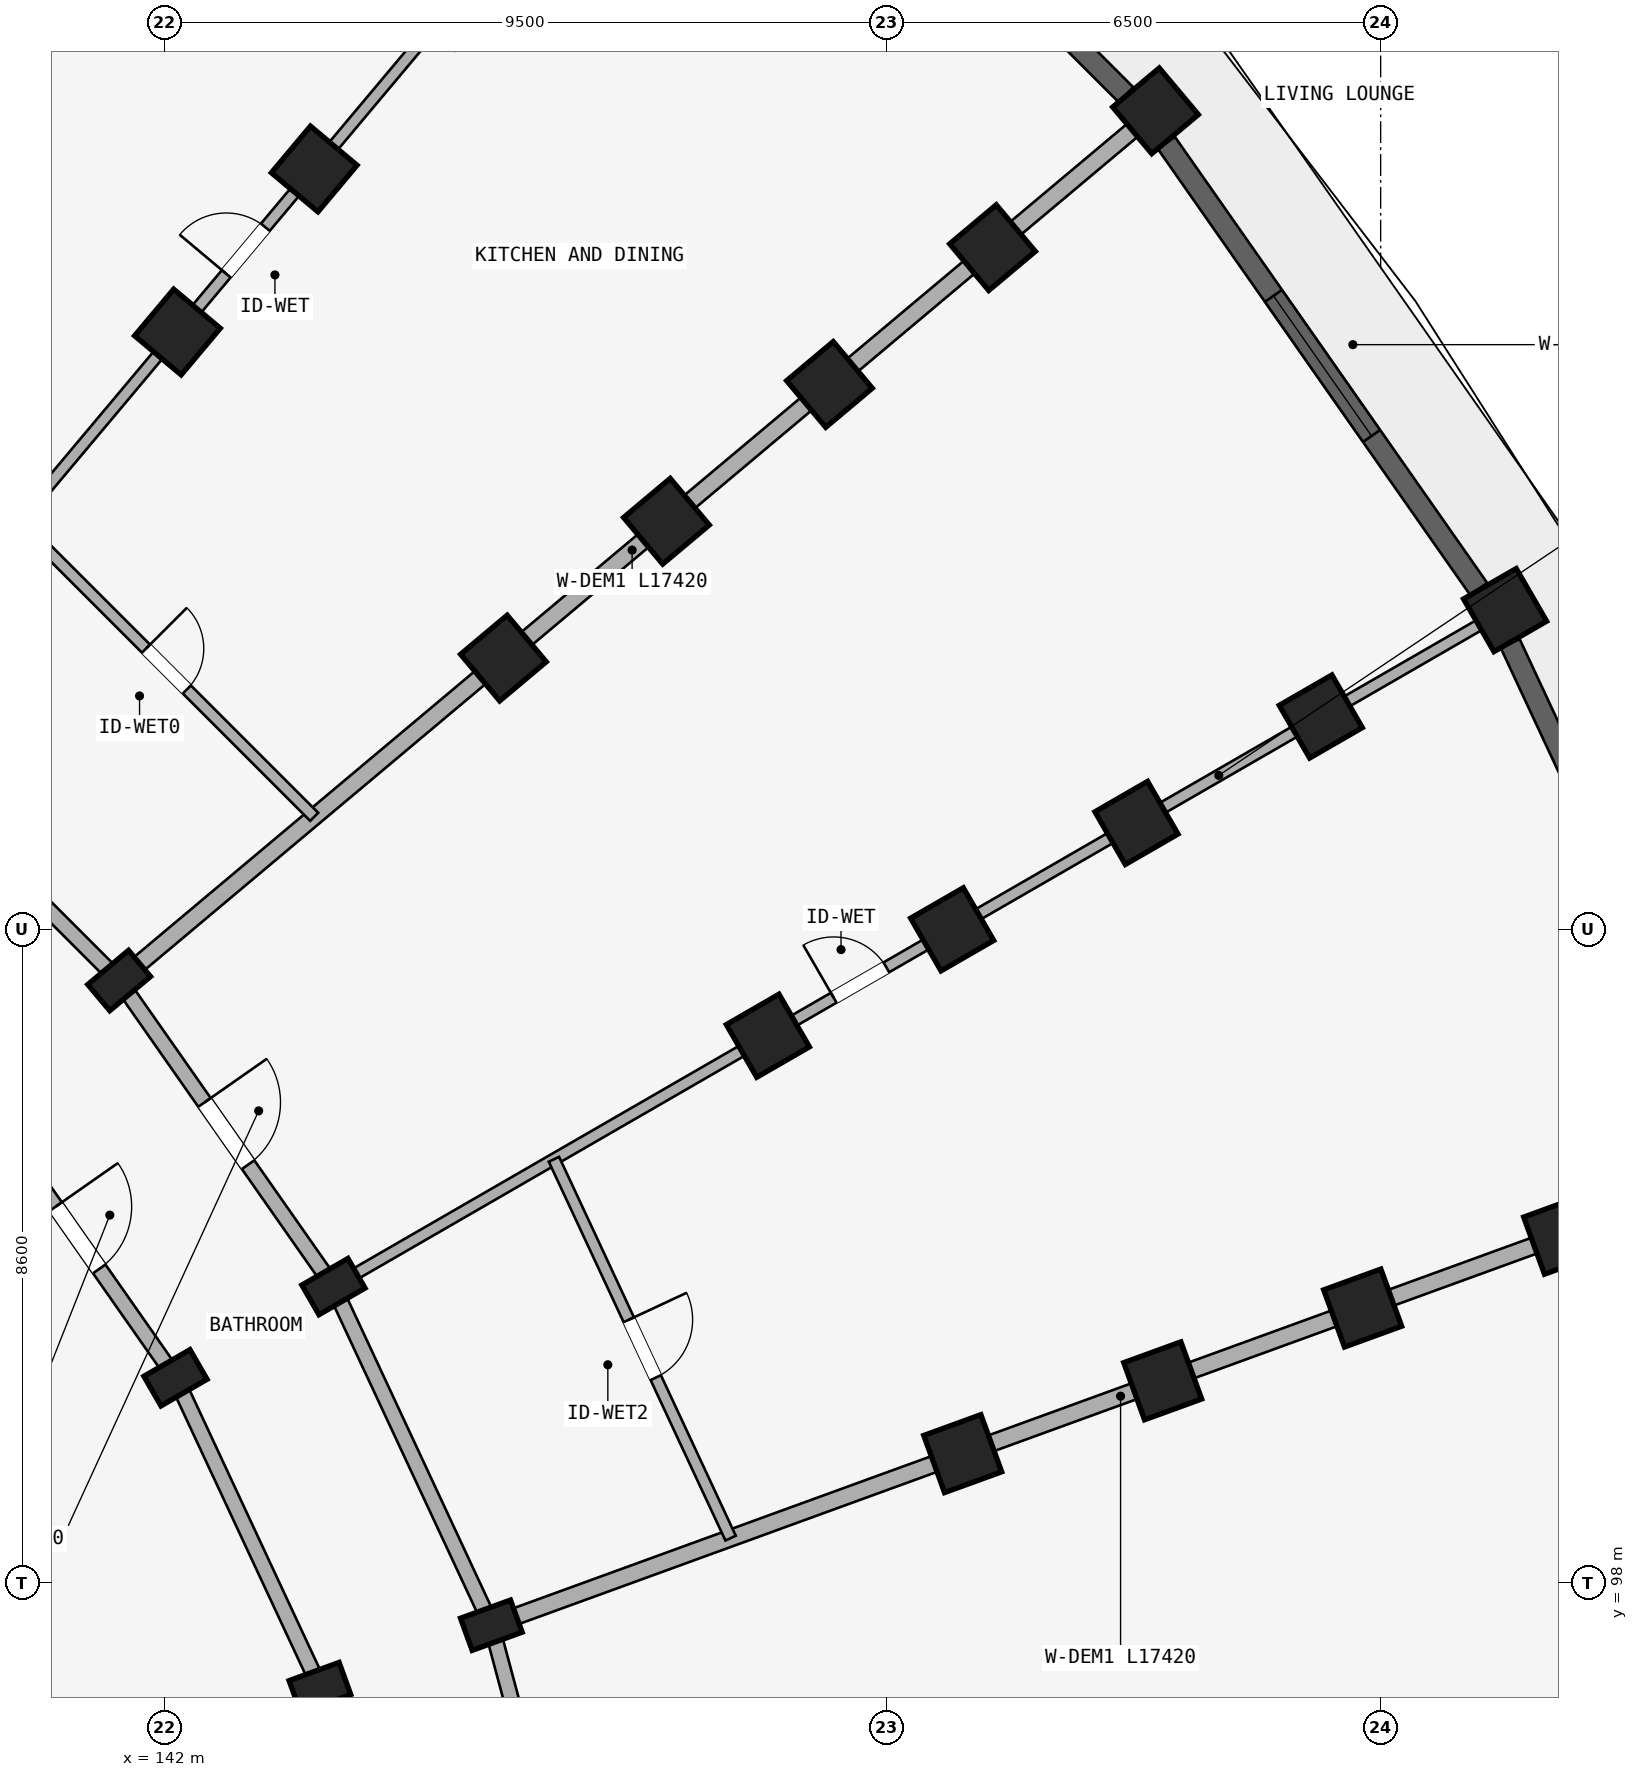
"""IFC4 building model, lengths in metres.
Left out: names, types, materials, properties, quantities, classifications, styles, units other than length and angle.
Written with IfcOpenShell. Run it as: python <this file> out.ifc"""

import sys

from ifc_helpers import new_model, si_unit, direction, frame, frame_2d, origin, origin_2d, place, context, subcontext, project, spatial, rectangle, extrude, element, fill, save


model = new_model("IFC4")
c1 = context("Model", 3, precision=1e-05, world=origin(), true_north=direction((0.0, 1.0)))
c2 = subcontext(c1, "Body", "Model", "MODEL_VIEW")
j1 = project(units=[si_unit("LENGTHUNIT", "METRE"), si_unit("PLANEANGLEUNIT", "RADIAN")], contexts=[c1])
p1 = place(None, origin())
s1 = spatial("IfcSite", under=j1, at=p1, CompositionType="ELEMENT")
p2 = place(p1, origin())
s2 = spatial("IfcBuilding", under=s1, at=p2, CompositionType="ELEMENT")
p3 = place(p2, frame((0.0, 0.0, 15.0)))
s3 = spatial("IfcBuildingStorey", under=s2, at=p3, CompositionType="ELEMENT", Elevation=15.0)
for number, where, z_axis, x_axis in (
    (1, (142.169, 114.458, 0.0), (0.0, 0.0, 1.0), (-0.766, 0.643, 0.0)),
    (2, (143.969, 116.603, 0.0), (0.0, 0.0, 1.0), (-0.766, 0.643, 0.0)),
):
    element("IfcColumn", number, at=place(p3, frame(where, z_axis=z_axis, x_axis=x_axis)), inside=s3, PredefinedType="COLUMN", context=c2, shape_type="SweptSolid", body=[
        extrude(rectangle(XDim=0.8, YDim=0.8, at=origin_2d()), origin(), (0.0, 0.0, 1.0), 2.93),
    ])
p4 = place(p3, frame((141.402, 105.927, 0.0), z_axis=(0.0, 0.0, 1.0), x_axis=(-0.642787609687, 0.766044443119, 0.0)))
e3 = element("IfcColumn", 3, at=p4, inside=s3, PredefinedType="COLUMN", context=c2, shape_type="SweptSolid", body=[
    extrude(rectangle(XDim=0.45, YDim=0.7, at=origin_2d()), origin(), (0.0, 0.0, 1.0), 2.93),
])
for number, where, z_axis, x_axis in (
    (4, (146.458, 110.169, 0.0), (0.0, 0.0, 1.0), (-0.643, 0.766, 0.0)),
    (5, (148.603, 111.969, 0.0), (0.0, 0.0, 1.0), (-0.643, 0.766, 0.0)),
    (6, (150.748, 113.769, 0.0), (0.0, 0.0, 1.0), (-0.643, 0.766, 0.0)),
    (7, (152.893, 115.568, 0.0), (0.0, 0.0, 1.0), (-0.643, 0.766, 0.0)),
    (8, (155.038, 117.368, 0.0), (0.0, 0.0, 1.0), (-0.643, 0.766, 0.0)),
):
    element("IfcColumn", number, at=place(p3, frame(where, z_axis=z_axis, x_axis=x_axis)), inside=s3, PredefinedType="COLUMN", context=c2, shape_type="SweptSolid", body=[
        extrude(rectangle(XDim=0.8, YDim=0.8, at=origin_2d()), origin(), (0.0, 0.0, 1.0), 2.93),
    ])
for number, where, z_axis, x_axis in (
    (9, (142.144, 100.7, 0.0), (0.0, 0.0, 1.0), (-0.5, 0.866, 0.0)),
    (10, (144.222, 101.9, 0.0), (0.0, 0.0, 1.0), (-0.5, 0.866, 0.0)),
):
    element("IfcColumn", number, at=place(p3, frame(where, z_axis=z_axis, x_axis=x_axis)), inside=s3, PredefinedType="COLUMN", context=c2, shape_type="SweptSolid", body=[
        extrude(rectangle(XDim=0.45, YDim=0.7, at=origin_2d()), origin(), (0.0, 0.0, 1.0), 2.93),
    ])
for number, where, z_axis, x_axis in (
    (11, (149.938, 105.2, 0.0), (0.0, 0.0, 1.0), (-0.5, 0.866, 0.0)),
    (12, (152.363, 106.6, 0.0), (0.0, 0.0, 1.0), (-0.5, 0.866, 0.0)),
    (13, (154.787, 108.0, 0.0), (0.0, 0.0, 1.0), (-0.5, 0.866, 0.0)),
    (14, (157.212, 109.4, 0.0), (0.0, 0.0, 1.0), (-0.5, 0.866, 0.0)),
    (15, (159.637, 110.8, 0.0), (0.0, 0.0, 1.0), (-0.5, 0.866, 0.0)),
):
    element("IfcColumn", number, at=place(p3, frame(where, z_axis=z_axis, x_axis=x_axis)), inside=s3, PredefinedType="COLUMN", context=c2, shape_type="SweptSolid", body=[
        extrude(rectangle(XDim=0.8, YDim=0.8, at=origin_2d()), origin(), (0.0, 0.0, 1.0), 2.93),
    ])
for number, where, z_axis, x_axis in (
    (16, (144.044, 96.624, 0.0), (0.0, 0.0, 1.0), (-0.342, 0.94, 0.0)),
    (17, (146.299, 97.445, 0.0), (0.0, 0.0, 1.0), (-0.342, 0.94, 0.0)),
):
    element("IfcColumn", number, at=place(p3, frame(where, z_axis=z_axis, x_axis=x_axis)), inside=s3, PredefinedType="COLUMN", context=c2, shape_type="SweptSolid", body=[
        extrude(rectangle(XDim=0.45, YDim=0.7, at=origin_2d()), origin(), (0.0, 0.0, 1.0), 2.93),
    ])
for number, where, z_axis, x_axis in (
    (18, (152.501, 99.702, 0.0), (0.0, 0.0, 1.0), (-0.342, 0.94, 0.0)),
    (19, (155.132, 100.66, 0.0), (0.0, 0.0, 1.0), (-0.342, 0.94, 0.0)),
    (20, (157.764, 101.618, 0.0), (0.0, 0.0, 1.0), (-0.342, 0.94, 0.0)),
    (21, (160.395, 102.575, 0.0), (0.0, 0.0, 1.0), (-0.342, 0.94, 0.0)),
):
    element("IfcColumn", number, at=place(p3, frame(where, z_axis=z_axis, x_axis=x_axis)), inside=s3, PredefinedType="COLUMN", context=c2, shape_type="SweptSolid", body=[
        extrude(rectangle(XDim=0.8, YDim=0.8, at=origin_2d()), origin(), (0.0, 0.0, 1.0), 2.93),
    ])
p5 = place(p3, frame((137.927, 109.402, 0.0), z_axis=(0.0, 0.0, 1.0), x_axis=(0.707106781187, -0.707106781187, 0.0)))
e22 = element("IfcWall", 22, at=p5, inside=s3, PredefinedType="STANDARD", context=c2, shape_type="SweptSolid", body=[
    extrude(rectangle(XDim=4.916, YDim=0.2, at=frame_2d((2.458, 0.0))), origin(), (0.0, 0.0, 1.0), 2.372),
])
p6 = place(p3, frame((139.564, 104.384, 0.0), z_axis=(0.0, 0.0, 1.0), x_axis=(0.573571637217, -0.819155404658, 0.0)))
e23 = element("IfcWall", 23, at=p6, inside=s3, PredefinedType="STANDARD", context=c2, shape_type="SweptSolid", body=[
    extrude(rectangle(XDim=4.497, YDim=0.2, at=frame_2d((2.249, 0.0))), origin(), (0.0, 0.0, 1.0), 2.372),
])
p7 = place(p6, frame((1.749, 0.0, 0.0)))
e24 = element("IfcOpeningElement", 24, at=p7, cuts=e23, PredefinedType="OPENING", context=c2, shape_type="SweptSolid", body=[
    extrude(rectangle(XDim=1.0, YDim=2.15, at=frame_2d((0.5, 1.075))), frame((0.0, 0.11, 0.0), z_axis=(0.0, -1.0, 0.0), x_axis=(1.0, 0.0, 0.0)), (0.0, 0.0, 1.0), 0.22),
])
p8 = place(p3, frame((141.402, 105.927, 0.0), z_axis=(0.0, 0.0, 1.0), x_axis=(0.573592335331, -0.819140911474, 0.0)))
e25 = element("IfcWall", 25, at=p8, inside=s3, PredefinedType="STANDARD", context=c2, shape_type="SweptSolid", body=[
    extrude(rectangle(XDim=4.916, YDim=0.2, at=frame_2d((2.458, 0.0))), origin(), (0.0, 0.0, 1.0), 2.372),
])
p9 = place(p8, frame((1.958, 0.0, 0.0)))
e26 = element("IfcOpeningElement", 26, at=p9, cuts=e25, PredefinedType="OPENING", context=c2, shape_type="SweptSolid", body=[
    extrude(rectangle(XDim=1.0, YDim=2.15, at=frame_2d((0.5, 1.075))), frame((0.0, 0.11, 0.0), z_axis=(0.0, -1.0, 0.0), x_axis=(1.0, 0.0, 0.0)), (0.0, 0.0, 1.0), 0.22),
])
p10 = place(p3, frame((142.144, 100.7, 0.0), z_axis=(0.0, 0.0, 1.0), x_axis=(0.422617978463, -0.906307919131, 0.0)))
e27 = element("IfcWall", 27, at=p10, inside=s3, PredefinedType="STANDARD", context=c2, shape_type="SweptSolid", body=[
    extrude(rectangle(XDim=4.497, YDim=0.2, at=frame_2d((2.249, 0.0))), origin(), (0.0, 0.0, 1.0), 2.372),
])
p11 = place(p3, frame((144.222, 101.9, 0.0), z_axis=(0.0, 0.0, 1.0), x_axis=(0.422629854778, -0.906302381024, 0.0)))
e28 = element("IfcWall", 28, at=p11, inside=s3, PredefinedType="STANDARD", context=c2, shape_type="SweptSolid", body=[
    extrude(rectangle(XDim=4.915, YDim=0.2, at=frame_2d((2.458, 0.0))), origin(), (0.0, 0.0, 1.0), 2.372),
])
p12 = place(p3, frame((144.044, 96.624, 0.0), z_axis=(0.0, 0.0, 1.0), x_axis=(0.258787642463, -0.965934240054, 0.0)))
e29 = element("IfcWall", 29, at=p12, inside=s3, PredefinedType="STANDARD", context=c2, shape_type="SweptSolid", body=[
    extrude(rectangle(XDim=4.497, YDim=0.2, at=frame_2d((2.249, 0.0))), origin(), (0.0, 0.0, 1.0), 2.372),
])
p13 = place(p3, frame((146.299, 97.445, 0.0), z_axis=(0.0, 0.0, 1.0), x_axis=(0.258803112091, -0.965930095386, 0.0)))
e30 = element("IfcWall", 30, at=p13, inside=s3, PredefinedType="STANDARD", context=c2, shape_type="SweptSolid", body=[
    extrude(rectangle(XDim=4.916, YDim=0.2, at=frame_2d((2.458, 0.0))), origin(), (0.0, 0.0, 1.0), 2.372),
])
p14 = place(p13, frame((1.938, 0.0, 0.0)))
e31 = element("IfcOpeningElement", 31, at=p14, cuts=e30, PredefinedType="OPENING", context=c2, shape_type="SweptSolid", body=[
    extrude(rectangle(XDim=1.04, YDim=2.15, at=frame_2d((0.52, 1.075))), frame((0.0, 0.11, 0.0), z_axis=(0.0, -1.0, 0.0), x_axis=(1.0, 0.0, 0.0)), (0.0, 0.0, 1.0), 0.22),
])
p15 = place(p3, frame((133.95, 112.309, 0.0), z_axis=(0.0, 0.0, 1.0), x_axis=(0.499997843263, 0.866026648973, 0.0)))
e32 = element("IfcWall", 32, at=p15, inside=s3, PredefinedType="STANDARD", context=c2, shape_type="SweptSolid", body=[
    extrude(rectangle(XDim=17.42, YDim=0.22, at=frame_2d((8.71, 0.0))), origin(), (0.0, 0.0, 1.0), 2.372),
])
p16 = place(p3, frame((137.991, 109.479, 0.0), z_axis=(0.0, 0.0, 1.0), x_axis=(0.642784757967, 0.766046835987, 0.0)))
e33 = element("IfcWall", 33, at=p16, inside=s3, PredefinedType="PARTITIONING", context=c2, shape_type="SweptSolid", body=[
    extrude(rectangle(XDim=17.42, YDim=0.15, at=frame_2d((8.71, 0.0))), origin(), (0.0, 0.0, 1.0), 2.372),
])
p17 = place(p16, frame((7.5, 0.0, 0.0)))
e34 = element("IfcOpeningElement", 34, at=p17, cuts=e33, PredefinedType="OPENING", context=c2, shape_type="SweptSolid", body=[
    extrude(rectangle(XDim=0.8, YDim=2.1, at=frame_2d((0.4, 1.05))), frame((0.0, 0.085, 0.0), z_axis=(0.0, -1.0, 0.0), x_axis=(1.0, 0.0, 0.0)), (0.0, 0.0, 1.0), 0.17),
])
p18 = place(p3, frame((141.479, 105.991, 0.0), z_axis=(0.0, 0.0, 1.0), x_axis=(0.766046835987, 0.642784757967, 0.0)))
e35 = element("IfcWall", 35, at=p18, inside=s3, PredefinedType="STANDARD", context=c2, shape_type="SweptSolid", body=[
    extrude(rectangle(XDim=17.42, YDim=0.22, at=frame_2d((8.71, 0.0))), origin(), (0.0, 0.0, 1.0), 2.372),
])
p19 = place(p3, frame((144.309, 101.95, 0.0), z_axis=(0.0, 0.0, 1.0), x_axis=(0.866026648973, 0.499997843263, 0.0)))
e36 = element("IfcWall", 36, at=p19, inside=s3, PredefinedType="PARTITIONING", context=c2, shape_type="SweptSolid", body=[
    extrude(rectangle(XDim=17.42, YDim=0.15, at=frame_2d((8.71, 0.0))), origin(), (0.0, 0.0, 1.0), 2.372),
])
p20 = place(p19, frame((7.5, 0.0, 0.0)))
e37 = element("IfcOpeningElement", 37, at=p20, cuts=e36, PredefinedType="OPENING", context=c2, shape_type="SweptSolid", body=[
    extrude(rectangle(XDim=0.8, YDim=2.1, at=frame_2d((0.4, 1.05))), frame((0.0, 0.085, 0.0), z_axis=(0.0, -1.0, 0.0), x_axis=(1.0, 0.0, 0.0)), (0.0, 0.0, 1.0), 0.17),
])
p21 = place(p3, frame((146.393, 97.479, 0.0), z_axis=(0.0, 0.0, 1.0), x_axis=(0.939691901159, 0.342022120477, 0.0)))
e38 = element("IfcWall", 38, at=p21, inside=s3, PredefinedType="STANDARD", context=c2, shape_type="SweptSolid", body=[
    extrude(rectangle(XDim=17.42, YDim=0.22, at=frame_2d((8.71, 0.0))), origin(), (0.0, 0.0, 1.0), 2.372),
])
p22 = place(p3, frame((140.08, 111.969, 0.0), z_axis=(0.0, 0.0, 1.0), x_axis=(0.707106781187, -0.707106781187, 0.0)))
e39 = element("IfcWall", 39, at=p22, inside=s3, PredefinedType="PLUMBINGWALL", context=c2, shape_type="SweptSolid", body=[
    extrude(rectangle(XDim=5.5, YDim=0.15, at=frame_2d((2.75, 0.0))), origin(), (0.0, 0.0, 1.0), 2.372),
])
p23 = place(p22, frame((2.37, 0.0, 0.0)))
e40 = element("IfcOpeningElement", 40, at=p23, cuts=e39, PredefinedType="OPENING", context=c2, shape_type="SweptSolid", body=[
    extrude(rectangle(XDim=0.76, YDim=2.05, at=frame_2d((0.38, 1.025))), frame((0.0, 0.085, 0.0), z_axis=(0.0, -1.0, 0.0), x_axis=(1.0, 0.0, 0.0)), (0.0, 0.0, 1.0), 0.17),
])
p24 = place(p3, frame((147.123, 103.575, 0.0), z_axis=(0.0, 0.0, 1.0), x_axis=(0.422630264446, -0.906302189986, 0.0)))
e41 = element("IfcWall", 41, at=p24, inside=s3, PredefinedType="PLUMBINGWALL", context=c2, shape_type="SweptSolid", body=[
    extrude(rectangle(XDim=5.5, YDim=0.15, at=frame_2d((2.75, 0.0))), origin(), (0.0, 0.0, 1.0), 2.372),
])
p25 = place(p24, frame((2.33, 0.0, 0.0)))
e42 = element("IfcOpeningElement", 42, at=p25, cuts=e41, PredefinedType="OPENING", context=c2, shape_type="SweptSolid", body=[
    extrude(rectangle(XDim=0.84, YDim=2.1, at=frame_2d((0.42, 1.05))), frame((0.0, 0.085, 0.0), z_axis=(0.0, -1.0, 0.0), x_axis=(1.0, 0.0, 0.0)), (0.0, 0.0, 1.0), 0.17),
])
p26 = place(p3, frame((149.582, 122.648, 0.0), z_axis=(0.0, 0.0, 1.0), x_axis=(0.707106781187, -0.707106781187, 0.0)))
e43 = element("IfcWall", 43, at=p26, inside=s3, PredefinedType="STANDARD", context=c2, shape_type="SweptSolid", body=[
    extrude(rectangle(XDim=7.164, YDim=0.275, at=frame_2d((3.582, 0.0))), origin(), (0.0, 0.0, 1.0), 2.472),
])
p27 = place(p26, frame((4.69, 0.0, 0.522)))
e44 = element("IfcOpeningElement", 44, at=p27, cuts=e43, PredefinedType="OPENING", context=c2, shape_type="SweptSolid", body=[
    extrude(rectangle(XDim=1.2, YDim=1.5, at=frame_2d((0.6, 0.75))), frame((0.0, 0.147, 0.0), z_axis=(0.0, -1.0, 0.0), x_axis=(1.0, 0.0, 0.0)), (0.0, 0.0, 1.0), 0.295),
])
p28 = place(p26, frame((1.907, 0.0, 0.0)))
e45 = element("IfcOpeningElement", 45, at=p28, cuts=e43, PredefinedType="OPENING", context=c2, shape_type="SweptSolid", body=[
    extrude(rectangle(XDim=1.2, YDim=2.15, at=frame_2d((0.6, 1.075))), frame((0.0, 0.147, 0.0), z_axis=(0.0, -1.0, 0.0), x_axis=(1.0, 0.0, 0.0)), (0.0, 0.0, 1.0), 0.295),
])
p29 = place(p3, frame((155.181, 116.947, 0.0), z_axis=(0.0, 0.0, 1.0), x_axis=(0.573562972382, -0.819161471697, 0.0)))
e46 = element("IfcWall", 46, at=p29, inside=s3, PredefinedType="STANDARD", context=c2, shape_type="SweptSolid", body=[
    extrude(rectangle(XDim=7.164, YDim=0.275, at=frame_2d((3.582, 0.0))), origin(), (0.0, 0.0, 1.0), 2.472),
])
p30 = place(p29, frame((2.457, 0.0, 0.322)))
e47 = element("IfcOpeningElement", 47, at=p30, cuts=e46, PredefinedType="OPENING", context=c2, shape_type="SweptSolid", body=[
    extrude(rectangle(XDim=2.25, YDim=1.95, at=frame_2d((1.125, 0.975))), frame((0.0, 0.147, 0.0), z_axis=(0.0, -1.0, 0.0), x_axis=(1.0, 0.0, 0.0)), (0.0, 0.0, 1.0), 0.295),
])
p31 = place(p3, frame((159.704, 110.36, 0.0), z_axis=(0.0, 0.0, 1.0), x_axis=(0.422633596215, -0.906300636296, 0.0)))
e48 = element("IfcWall", 48, at=p31, inside=s3, PredefinedType="STANDARD", context=c2, shape_type="SweptSolid", body=[
    extrude(rectangle(XDim=7.164, YDim=0.275, at=frame_2d((3.582, 0.0))), origin(), (0.0, 0.0, 1.0), 2.472),
])
p32 = place(p31, frame((2.532, 0.0, 0.472)))
e49 = element("IfcOpeningElement", 49, at=p32, cuts=e48, PredefinedType="OPENING", context=c2, shape_type="SweptSolid", body=[
    extrude(rectangle(XDim=2.1, YDim=1.8, at=frame_2d((1.05, 0.9))), frame((0.0, 0.147, 0.0), z_axis=(0.0, -1.0, 0.0), x_axis=(1.0, 0.0, 0.0)), (0.0, 0.0, 1.0), 0.295),
])
p33 = place(p30, origin())
e50 = element("IfcWindow", 50, at=p33, inside=s3, PartitioningType="TRIPLE_PANEL_VERTICAL", PredefinedType="WINDOW", context=c2, shape_type="SweptSolid", body=[
    extrude(rectangle(XDim=2.25, YDim=1.95, at=frame_2d((1.125, 0.975))), frame((0.0, 0.03, 0.0), z_axis=(0.0, -1.0, 0.0), x_axis=(1.0, 0.0, 0.0)), (0.0, 0.0, 1.0), 0.06),
])
fill(e47, e50)
p34 = place(p17, origin())
e51 = element("IfcDoor", 51, at=p34, inside=s3, OperationType="SINGLE_SWING_LEFT", PredefinedType="DOOR", context=c2, shape_type="SweptSolid", body=[
    extrude(rectangle(XDim=0.8, YDim=2.1, at=frame_2d((0.4, 1.05))), frame((0.0, 0.025, 0.0), z_axis=(0.0, -1.0, 0.0), x_axis=(1.0, 0.0, 0.0)), (0.0, 0.0, 1.0), 0.05),
])
fill(e34, e51)
p35 = place(p20, frame((0.8, 0.0, 0.0), z_axis=(0.0, 0.0, 1.0), x_axis=(-1.0, 0.0, 0.0)))
e52 = element("IfcDoor", 52, at=p35, inside=s3, OperationType="SINGLE_SWING_RIGHT", PredefinedType="DOOR", context=c2, shape_type="SweptSolid", body=[
    extrude(rectangle(XDim=0.8, YDim=2.1, at=frame_2d((0.4, 1.05))), frame((0.0, 0.025, 0.0), z_axis=(0.0, -1.0, 0.0), x_axis=(1.0, 0.0, 0.0)), (0.0, 0.0, 1.0), 0.05),
])
fill(e37, e52)
p36 = place(p23, origin())
e53 = element("IfcDoor", 53, at=p36, inside=s3, OperationType="SINGLE_SWING_LEFT", PredefinedType="DOOR", context=c2, shape_type="SweptSolid", body=[
    extrude(rectangle(XDim=0.76, YDim=2.05, at=frame_2d((0.38, 1.025))), frame((0.0, 0.025, 0.0), z_axis=(0.0, -1.0, 0.0), x_axis=(1.0, 0.0, 0.0)), (0.0, 0.0, 1.0), 0.05),
])
fill(e40, e53)
p37 = place(p9, frame((1.0, 0.0, 0.0), z_axis=(0.0, 0.0, 1.0), x_axis=(-1.0, 0.0, 0.0)))
e54 = element("IfcDoor", 54, at=p37, inside=s3, OperationType="SINGLE_SWING_RIGHT", PredefinedType="DOOR", context=c2, shape_type="SweptSolid", body=[
    extrude(rectangle(XDim=1.0, YDim=2.15, at=frame_2d((0.5, 1.075))), frame((0.0, 0.025, 0.0), z_axis=(0.0, -1.0, 0.0), x_axis=(1.0, 0.0, 0.0)), (0.0, 0.0, 1.0), 0.05),
])
fill(e26, e54)
p38 = place(p25, origin())
e55 = element("IfcDoor", 55, at=p38, inside=s3, OperationType="SINGLE_SWING_LEFT", PredefinedType="DOOR", context=c2, shape_type="SweptSolid", body=[
    extrude(rectangle(XDim=0.84, YDim=2.1, at=frame_2d((0.42, 1.05))), frame((0.0, 0.025, 0.0), z_axis=(0.0, -1.0, 0.0), x_axis=(1.0, 0.0, 0.0)), (0.0, 0.0, 1.0), 0.05),
])
fill(e42, e55)
p39 = place(p7, frame((1.0, 0.0, 0.0), z_axis=(0.0, 0.0, 1.0), x_axis=(-1.0, 0.0, 0.0)))
e56 = element("IfcDoor", 56, at=p39, inside=s3, OperationType="SINGLE_SWING_RIGHT", PredefinedType="DOOR", context=c2, shape_type="SweptSolid", body=[
    extrude(rectangle(XDim=1.0, YDim=2.15, at=frame_2d((0.5, 1.075))), frame((0.0, 0.025, 0.0), z_axis=(0.0, -1.0, 0.0), x_axis=(1.0, 0.0, 0.0)), (0.0, 0.0, 1.0), 0.05),
])
fill(e24, e56)
save(model, sys.argv[1])
